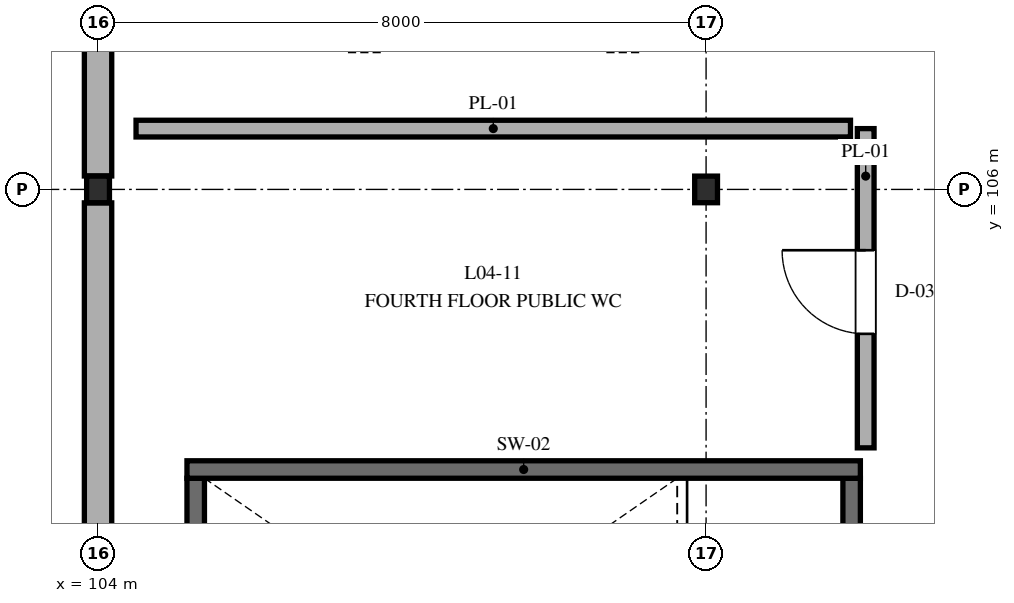
"""IFC4 building model, lengths in metres.
Left out: names, types, materials, properties, quantities, classifications, styles, units other than length and angle.
Written with IfcOpenShell. Run it as: python <this file> out.ifc"""

import sys

from ifc_helpers import new_model, si_unit, direction, frame, frame_2d, origin, origin_2d, place, context, subcontext, project, spatial, rectangle, i_section, extrude, element, fill, save


model = new_model("IFC4")
c1 = context("Model", 3, precision=1e-05, world=origin(), true_north=direction((0.0, 1.0)))
c2 = subcontext(c1, "Body", "Model", "MODEL_VIEW")
j1 = project(units=[si_unit("LENGTHUNIT", "METRE"), si_unit("PLANEANGLEUNIT", "RADIAN")], contexts=[c1])
p1 = place(None, origin())
s1 = spatial("IfcSite", under=j1, at=p1, CompositionType="ELEMENT")
p2 = place(p1, origin())
s2 = spatial("IfcBuilding", under=s1, at=p2, CompositionType="ELEMENT")
p3 = place(p2, frame((0.0, 0.0, 18.6)))
s3 = spatial("IfcBuildingStorey", under=s2, at=p3, CompositionType="ELEMENT", Elevation=18.6)
for number, where, z_axis, x_axis in (
    (1, (104.0, 106.0, 0.0), (0.0, 0.0, 1.0), (1.0, 0.0, 0.0)),
    (2, (112.0, 106.0, 0.0), (0.0, 0.0, 1.0), (1.0, 0.0, 0.0)),
):
    element("IfcColumn", number, at=place(p3, frame(where, z_axis=z_axis, x_axis=x_axis)), inside=s3, PredefinedType="COLUMN", context=c2, shape_type="SweptSolid", body=[
        extrude(i_section(OverallWidth=0.3, OverallDepth=0.35, WebThickness=0.01, FlangeThickness=0.018, FilletRadius=0.027, at=origin_2d()), origin(), (0.0, 0.0, 1.0), 3.6),
    ])
p4 = place(p3, frame((104.0, 105.823, 0.0), z_axis=(0.0, 0.0, 1.0), x_axis=(0.0, -1.0, 0.0)))
e3 = element("IfcWall", 3, at=p4, inside=s3, PredefinedType="STANDARD", context=c2, shape_type="SweptSolid", body=[
    extrude(rectangle(XDim=7.646, YDim=0.36, at=frame_2d((3.823, 0.0))), origin(), (0.0, 0.0, 1.0), 3.05),
])
p5 = place(p3, frame((104.0, 116.823, 0.0), z_axis=(0.0, 0.0, 1.0), x_axis=(0.0, -1.0, 0.0)))
e4 = element("IfcWall", 4, at=p5, inside=s3, PredefinedType="STANDARD", context=c2, shape_type="SweptSolid", body=[
    extrude(rectangle(XDim=10.646, YDim=0.36, at=frame_2d((5.323, 0.0))), origin(), (0.0, 0.0, 1.0), 3.05),
])
p6 = place(p3, frame((113.915, 97.9, 0.0), z_axis=(0.0, 0.0, 1.0), x_axis=(0.0, 1.0, 0.0)))
e5 = element("IfcWall", 5, at=p6, inside=s3, PredefinedType="SHEAR", context=c2, shape_type="SweptSolid", body=[
    extrude(rectangle(XDim=4.3, YDim=0.23, at=frame_2d((2.15, 0.0))), origin(), (0.0, 0.0, 1.0), 3.6),
])
p7 = place(p6, frame((1.425, 0.0, 0.0)))
e6 = element("IfcOpeningElement", 6, at=p7, cuts=e5, PredefinedType="OPENING", context=c2, shape_type="SweptSolid", body=[
    extrude(rectangle(XDim=1.45, YDim=2.2, at=frame_2d((0.725, 1.1))), frame((0.0, 0.125, 0.0), z_axis=(0.0, -1.0, 0.0), x_axis=(1.0, 0.0, 0.0)), (0.0, 0.0, 1.0), 0.25),
])
p8 = place(p3, frame((105.285, 102.2, 0.0), z_axis=(0.0, 0.0, 1.0), x_axis=(0.0, -1.0, 0.0)))
e7 = element("IfcWall", 7, at=p8, inside=s3, PredefinedType="SHEAR", context=c2, shape_type="SweptSolid", body=[
    extrude(rectangle(XDim=4.3, YDim=0.23, at=frame_2d((2.15, 0.0))), origin(), (0.0, 0.0, 1.0), 3.6),
])
p9 = place(p3, frame((114.03, 102.315, 0.0), z_axis=(0.0, 0.0, 1.0), x_axis=(-1.0, 0.0, 0.0)))
e8 = element("IfcWall", 8, at=p9, inside=s3, PredefinedType="SHEAR", context=c2, shape_type="SweptSolid", body=[
    extrude(rectangle(XDim=8.86, YDim=0.23, at=frame_2d((4.43, 0.0))), origin(), (0.0, 0.0, 1.0), 3.6),
])
p10 = place(p3, frame((114.1, 102.6, 0.0), z_axis=(0.0, 0.0, 1.0), x_axis=(0.0, 1.0, 0.0)))
e9 = element("IfcWall", 9, at=p10, inside=s3, PredefinedType="PLUMBINGWALL", context=c2, shape_type="SweptSolid", body=[
    extrude(rectangle(XDim=4.2, YDim=0.22, at=frame_2d((2.1, 0.0))), origin(), (0.0, 0.0, 1.0), 3.05),
])
p11 = place(p10, frame((1.5, 0.0, 0.0)))
e10 = element("IfcOpeningElement", 10, at=p11, cuts=e9, PredefinedType="OPENING", context=c2, shape_type="SweptSolid", body=[
    extrude(rectangle(XDim=1.1, YDim=2.2, at=frame_2d((0.55, 1.1))), frame((0.0, 0.12, 0.0), z_axis=(0.0, -1.0, 0.0), x_axis=(1.0, 0.0, 0.0)), (0.0, 0.0, 1.0), 0.24),
])
p12 = place(p3, frame((104.5, 106.8, 0.0), z_axis=(0.0, 0.0, 1.0), x_axis=(1.0, 0.0, 0.0)))
e11 = element("IfcWall", 11, at=p12, inside=s3, PredefinedType="PLUMBINGWALL", context=c2, shape_type="SweptSolid", body=[
    extrude(rectangle(XDim=9.4, YDim=0.22, at=frame_2d((4.7, 0.0))), origin(), (0.0, 0.0, 1.0), 3.05),
])
p13 = place(p11, origin())
e12 = element("IfcDoor", 12, at=p13, inside=s3, OperationType="SINGLE_SWING_RIGHT", PredefinedType="DOOR", context=c2, shape_type="SweptSolid", body=[
    extrude(rectangle(XDim=1.1, YDim=2.2, at=frame_2d((0.55, 1.1))), frame((0.0, 0.025, 0.0), z_axis=(0.0, -1.0, 0.0), x_axis=(1.0, 0.0, 0.0)), (0.0, 0.0, 1.0), 0.05),
])
fill(e10, e12)
save(model, sys.argv[1])
